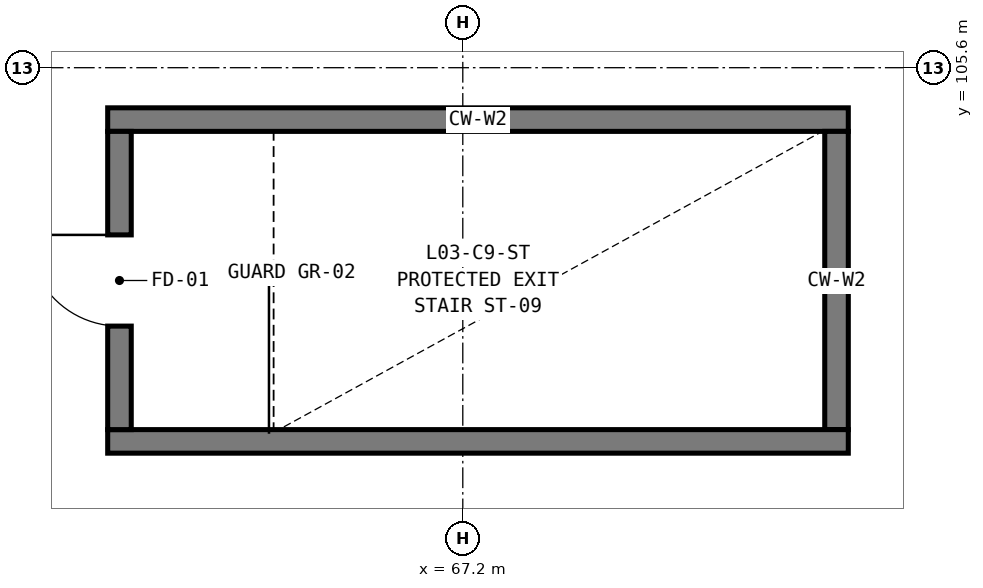
"""IFC4 building model, lengths in metres.
Left out: names, types, materials, properties, quantities, classifications, styles, units other than length and angle.
Written with IfcOpenShell. Run it as: python <this file> out.ifc"""

import sys

from ifc_helpers import new_model, si_unit, direction, frame, frame_2d, origin, place, context, subcontext, project, spatial, rectangle, extrude, element, fill, save


model = new_model("IFC4")
c1 = context("Model", 3, precision=1e-05, world=origin(), true_north=direction((0.0, 1.0)))
c2 = subcontext(c1, "Body", "Model", "MODEL_VIEW")
j1 = project(units=[si_unit("LENGTHUNIT", "METRE"), si_unit("PLANEANGLEUNIT", "RADIAN")], contexts=[c1])
p1 = place(None, origin())
s1 = spatial("IfcSite", under=j1, at=p1, CompositionType="ELEMENT")
p2 = place(p1, origin())
s2 = spatial("IfcBuilding", under=s1, at=p2, CompositionType="ELEMENT")
p3 = place(p2, frame((0.0, 0.0, 16.8)))
s3 = spatial("IfcBuildingStorey", under=s2, at=p3, CompositionType="ELEMENT", Elevation=16.8)
p4 = place(p3, frame((62.528, 104.917, 0.0), z_axis=(0.0, 0.0, 1.0), x_axis=(1.0, 0.0, 0.0)))
e1 = element("IfcWall", 1, at=p4, inside=s3, PredefinedType="SHEAR", context=c2, shape_type="SweptSolid", body=[
    extrude(rectangle(XDim=9.744, YDim=0.31, at=frame_2d((4.872, 0.0))), origin(), (0.0, 0.0, 1.0), 5.1),
])
p5 = place(p3, frame((72.117, 104.762, 0.0), z_axis=(0.0, 0.0, 1.0), x_axis=(0.0, -1.0, 0.0)))
e2 = element("IfcWall", 2, at=p5, inside=s3, PredefinedType="SHEAR", context=c2, shape_type="SweptSolid", body=[
    extrude(rectangle(XDim=3.924, YDim=0.31, at=frame_2d((1.962, 0.0))), origin(), (0.0, 0.0, 1.0), 5.1),
])
p6 = place(p3, frame((72.272, 100.683, 0.0), z_axis=(0.0, 0.0, 1.0), x_axis=(-1.0, 0.0, 0.0)))
e3 = element("IfcWall", 3, at=p6, inside=s3, PredefinedType="SHEAR", context=c2, shape_type="SweptSolid", body=[
    extrude(rectangle(XDim=9.744, YDim=0.31, at=frame_2d((4.872, 0.0))), origin(), (0.0, 0.0, 1.0), 5.1),
])
p7 = place(p3, frame((62.683, 100.838, 0.0), z_axis=(0.0, 0.0, 1.0), x_axis=(0.0, 1.0, 0.0)))
e4 = element("IfcWall", 4, at=p7, inside=s3, PredefinedType="SHEAR", context=c2, shape_type="SweptSolid", body=[
    extrude(rectangle(XDim=3.924, YDim=0.31, at=frame_2d((1.962, 0.0))), origin(), (0.0, 0.0, 1.0), 5.1),
])
p8 = place(p7, frame((1.362, 0.0, 0.0)))
e5 = element("IfcOpeningElement", 5, at=p8, cuts=e4, PredefinedType="OPENING", context=c2, shape_type="SweptSolid", body=[
    extrude(rectangle(XDim=1.2, YDim=2.2, at=frame_2d((0.6, 1.1))), frame((0.0, 0.165, 0.0), z_axis=(0.0, -1.0, 0.0), x_axis=(1.0, 0.0, 0.0)), (0.0, 0.0, 1.0), 0.33),
])
p9 = place(p8, origin())
e6 = element("IfcDoor", 6, at=p9, inside=s3, OperationType="SINGLE_SWING_RIGHT", PredefinedType="DOOR", context=c2, shape_type="SweptSolid", body=[
    extrude(rectangle(XDim=1.2, YDim=2.2, at=frame_2d((0.6, 1.1))), frame((0.0, 0.025, 0.0), z_axis=(0.0, -1.0, 0.0), x_axis=(1.0, 0.0, 0.0)), (0.0, 0.0, 1.0), 0.05),
])
fill(e5, e6)
save(model, sys.argv[1])
